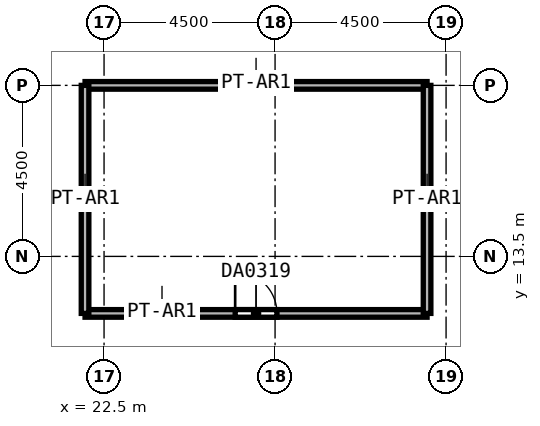
"""IFC4 building model, lengths in metres.
Left out: names, types, materials, properties, quantities, classifications, styles, units other than length and angle.
Written with IfcOpenShell. Run it as: python <this file> out.ifc"""

import sys

from ifc_helpers import new_model, si_unit, direction, frame, frame_2d, origin, place, context, subcontext, project, spatial, rectangle, extrude, element, fill, save


model = new_model("IFC4")
c1 = context("Model", 3, precision=1e-05, world=origin(), true_north=direction((0.0, 1.0)))
c2 = subcontext(c1, "Body", "Model", "MODEL_VIEW")
j1 = project(units=[si_unit("LENGTHUNIT", "METRE"), si_unit("PLANEANGLEUNIT", "RADIAN")], contexts=[c1])
p1 = place(None, origin())
s1 = spatial("IfcSite", under=j1, at=p1, CompositionType="ELEMENT")
p2 = place(p1, origin())
s2 = spatial("IfcBuilding", under=s1, at=p2, CompositionType="ELEMENT")
p3 = place(p2, origin())
s3 = spatial("IfcBuildingStorey", under=s2, at=p3, CompositionType="ELEMENT", Elevation=0.0)
p4 = place(p3, frame((22.0, 12.0, 0.0), z_axis=(0.0, 0.0, 1.0), x_axis=(1.0, 0.0, 0.0)))
e1 = element("IfcWall", 1, at=p4, inside=s3, PredefinedType="PARTITIONING", context=c2, shape_type="SweptSolid", body=[
    extrude(rectangle(XDim=9.0, YDim=0.2, at=frame_2d((4.5, 0.0))), origin(), (0.0, 0.0, 1.0), 11.7),
])
p5 = place(p4, frame((3.95, 0.0, 0.0)))
e2 = element("IfcOpeningElement", 2, at=p5, cuts=e1, PredefinedType="OPENING", context=c2, shape_type="SweptSolid", body=[
    extrude(rectangle(XDim=1.1, YDim=2.4, at=frame_2d((0.55, 1.2))), frame((0.0, 0.1, 0.0), z_axis=(0.0, -1.0, 0.0), x_axis=(1.0, 0.0, 0.0)), (0.0, 0.0, 1.0), 0.2),
])
p6 = place(p3, frame((31.0, 18.0, 0.0), z_axis=(0.0, 0.0, 1.0), x_axis=(-1.0, 0.0, 0.0)))
e3 = element("IfcWall", 3, at=p6, inside=s3, PredefinedType="PARTITIONING", context=c2, shape_type="SweptSolid", body=[
    extrude(rectangle(XDim=9.0, YDim=0.2, at=frame_2d((4.5, 0.0))), origin(), (0.0, 0.0, 1.0), 11.7),
])
for number, where, z_axis, x_axis in (
    (4, (22.0, 18.0, 0.0), (0.0, 0.0, 1.0), (0.0, -1.0, 0.0)),
    (5, (31.0, 12.0, 0.0), (0.0, 0.0, 1.0), (0.0, 1.0, 0.0)),
):
    element("IfcWall", number, at=place(p3, frame(where, z_axis=z_axis, x_axis=x_axis)), inside=s3, PredefinedType="PARTITIONING", context=c2, shape_type="SweptSolid", body=[
        extrude(rectangle(XDim=6.0, YDim=0.2, at=frame_2d((3.0, 0.0))), origin(), (0.0, 0.0, 1.0), 11.7),
    ])
p7 = place(p5, origin())
e6 = element("IfcDoor", 6, at=p7, inside=s3, OperationType="DOUBLE_DOOR_SINGLE_SWING", PredefinedType="DOOR", context=c2, shape_type="SweptSolid", body=[
    extrude(rectangle(XDim=1.1, YDim=2.4, at=frame_2d((0.55, 1.2))), frame((0.0, 0.025, 0.0), z_axis=(0.0, -1.0, 0.0), x_axis=(1.0, 0.0, 0.0)), (0.0, 0.0, 1.0), 0.05),
])
fill(e2, e6)
save(model, sys.argv[1])
